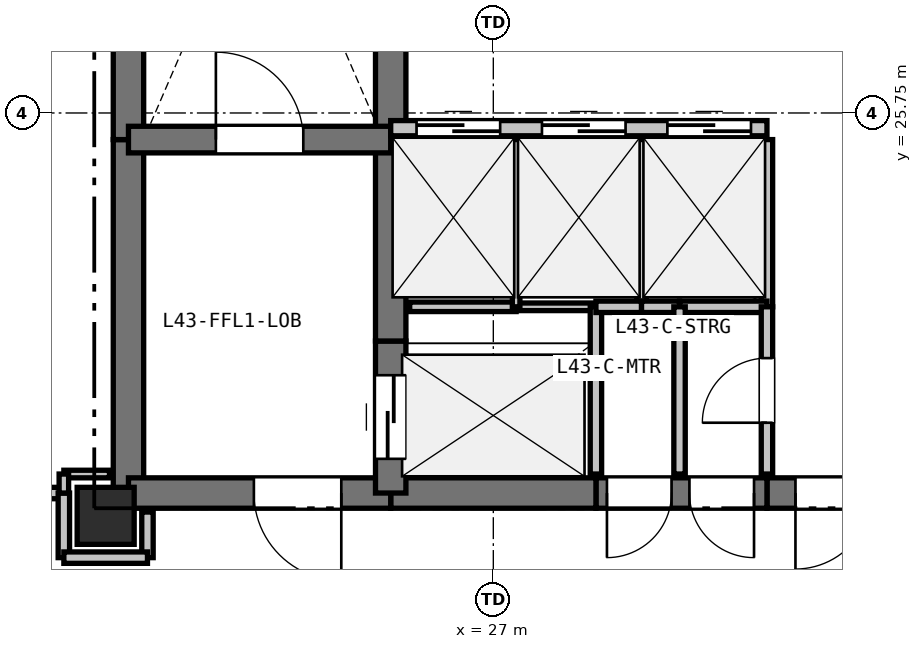
"""IFC4 building model, lengths in metres.
Left out: names, types, materials, properties, quantities, classifications, styles, units other than length and angle.
Written with IfcOpenShell. Run it as: python <this file> out.ifc"""

import sys

from ifc_helpers import new_model, si_unit, direction, frame, frame_2d, origin, origin_2d, place, context, subcontext, project, spatial, rectangle, extrude, element, fill, save


model = new_model("IFC4")
c1 = context("Model", 3, precision=1e-05, world=origin(), true_north=direction((0.0, 1.0)))
c2 = subcontext(c1, "Body", "Model", "MODEL_VIEW")
j1 = project(units=[si_unit("LENGTHUNIT", "METRE"), si_unit("PLANEANGLEUNIT", "RADIAN")], contexts=[c1])
p1 = place(None, origin())
s1 = spatial("IfcSite", under=j1, at=p1, CompositionType="ELEMENT")
p2 = place(p1, origin())
s2 = spatial("IfcBuilding", under=s1, at=p2, CompositionType="ELEMENT")
p3 = place(p2, frame((0.0, 0.0, 154.2)))
s3 = spatial("IfcBuildingStorey", under=s2, at=p3, CompositionType="ELEMENT", Elevation=154.2)
p4 = place(p3, frame((21.9, 20.45, 0.0), z_axis=(0.0, 0.0, 1.0), x_axis=(1.0, 0.0, 0.0)))
e1 = element("IfcColumn", 1, at=p4, inside=s3, PredefinedType="COLUMN", context=c2, shape_type="SweptSolid", body=[
    extrude(rectangle(XDim=0.75, YDim=0.75, at=origin_2d()), origin(), (0.0, 0.0, 1.0), 3.3),
])
p5 = place(p3, frame((22.2, 20.75, 0.0), z_axis=(0.0, 0.0, 1.0), x_axis=(0.0, 1.0, 0.0)))
e2 = element("IfcWall", 2, at=p5, inside=s3, PredefinedType="SHEAR", context=c2, shape_type="SweptSolid", body=[
    extrude(rectangle(XDim=4.65, YDim=0.4, at=frame_2d((2.325, 0.0))), origin(), (0.0, 0.0, 1.0), 3.06),
])
p6 = place(p3, frame((22.2, 25.4, 0.0), z_axis=(0.0, 0.0, 1.0), x_axis=(0.0, 1.0, 0.0)))
e3 = element("IfcWall", 3, at=p6, inside=s3, PredefinedType="SHEAR", context=c2, shape_type="SweptSolid", body=[
    extrude(rectangle(XDim=7.35, YDim=0.4, at=frame_2d((3.675, 0.0))), origin(), (0.0, 0.0, 1.0), 3.06),
])
p7 = place(p3, frame((32.35, 20.75, 0.0), z_axis=(0.0, 0.0, 1.0), x_axis=(-1.0, 0.0, 0.0)))
e4 = element("IfcWall", 4, at=p7, inside=s3, PredefinedType="SHEAR", context=c2, shape_type="SweptSolid", body=[
    extrude(rectangle(XDim=1.75, YDim=0.4, at=frame_2d((0.875, 0.0))), origin(), (0.0, 0.0, 1.0), 3.06),
])
p8 = place(p7, frame((0.375, 0.0, 0.0)))
e5 = element("IfcOpeningElement", 5, at=p8, cuts=e4, PredefinedType="OPENING", context=c2, shape_type="SweptSolid", body=[
    extrude(rectangle(XDim=1.0, YDim=2.15, at=frame_2d((0.5, 1.075))), frame((0.0, 0.21, 0.0), z_axis=(0.0, -1.0, 0.0), x_axis=(1.0, 0.0, 0.0)), (0.0, 0.0, 1.0), 0.42),
])
p9 = place(p3, frame((30.6, 20.75, 0.0), z_axis=(0.0, 0.0, 1.0), x_axis=(-1.0, 0.0, 0.0)))
e6 = element("IfcWall", 6, at=p9, inside=s3, PredefinedType="SHEAR", context=c2, shape_type="SweptSolid", body=[
    extrude(rectangle(XDim=2.25, YDim=0.4, at=frame_2d((1.125, 0.0))), origin(), (0.0, 0.0, 1.0), 3.06),
])
p10 = place(p9, frame((1.255, 0.0, 0.0)))
e7 = element("IfcOpeningElement", 7, at=p10, cuts=e6, PredefinedType="OPENING", context=c2, shape_type="SweptSolid", body=[
    extrude(rectangle(XDim=0.85, YDim=2.1, at=frame_2d((0.425, 1.05))), frame((0.0, 0.21, 0.0), z_axis=(0.0, -1.0, 0.0), x_axis=(1.0, 0.0, 0.0)), (0.0, 0.0, 1.0), 0.42),
])
p11 = place(p9, frame((0.17, 0.0, 0.0)))
e8 = element("IfcOpeningElement", 8, at=p11, cuts=e6, PredefinedType="OPENING", context=c2, shape_type="SweptSolid", body=[
    extrude(rectangle(XDim=0.85, YDim=2.1, at=frame_2d((0.425, 1.05))), frame((0.0, 0.21, 0.0), z_axis=(0.0, -1.0, 0.0), x_axis=(1.0, 0.0, 0.0)), (0.0, 0.0, 1.0), 0.42),
])
p12 = place(p3, frame((28.35, 20.75, 0.0), z_axis=(0.0, 0.0, 1.0), x_axis=(-1.0, 0.0, 0.0)))
e9 = element("IfcWall", 9, at=p12, inside=s3, PredefinedType="SHEAR", context=c2, shape_type="SweptSolid", body=[
    extrude(rectangle(XDim=2.7, YDim=0.4, at=frame_2d((1.35, 0.0))), origin(), (0.0, 0.0, 1.0), 3.06),
])
p13 = place(p3, frame((25.65, 20.75, 0.0), z_axis=(0.0, 0.0, 1.0), x_axis=(-1.0, 0.0, 0.0)))
e10 = element("IfcWall", 10, at=p13, inside=s3, PredefinedType="SHEAR", context=c2, shape_type="SweptSolid", body=[
    extrude(rectangle(XDim=3.45, YDim=0.4, at=frame_2d((1.725, 0.0))), origin(), (0.0, 0.0, 1.0), 3.06),
])
p14 = place(p13, frame((0.65, 0.0, 0.0)))
e11 = element("IfcOpeningElement", 11, at=p14, cuts=e10, PredefinedType="OPENING", context=c2, shape_type="SweptSolid", body=[
    extrude(rectangle(XDim=1.15, YDim=2.15, at=frame_2d((0.575, 1.075))), frame((0.0, 0.21, 0.0), z_axis=(0.0, -1.0, 0.0), x_axis=(1.0, 0.0, 0.0)), (0.0, 0.0, 1.0), 0.42),
])
p15 = place(p3, frame((25.65, 20.75, 0.0), z_axis=(0.0, 0.0, 1.0), x_axis=(0.0, 1.0, 0.0)))
e12 = element("IfcWall", 12, at=p15, inside=s3, PredefinedType="SHEAR", context=c2, shape_type="SweptSolid", body=[
    extrude(rectangle(XDim=2.0, YDim=0.4, at=frame_2d((1.0, 0.0))), origin(), (0.0, 0.0, 1.0), 3.06),
])
p16 = place(p15, frame((0.45, 0.0, 0.0)))
e13 = element("IfcOpeningElement", 13, at=p16, cuts=e12, PredefinedType="OPENING", context=c2, shape_type="SweptSolid", body=[
    extrude(rectangle(XDim=1.1, YDim=2.15, at=frame_2d((0.55, 1.075))), frame((0.0, 0.21, 0.0), z_axis=(0.0, -1.0, 0.0), x_axis=(1.0, 0.0, 0.0)), (0.0, 0.0, 1.0), 0.42),
])
p17 = place(p3, frame((25.65, 22.75, 0.0), z_axis=(0.0, 0.0, 1.0), x_axis=(0.0, 1.0, 0.0)))
e14 = element("IfcWall", 14, at=p17, inside=s3, PredefinedType="SHEAR", context=c2, shape_type="SweptSolid", body=[
    extrude(rectangle(XDim=2.8, YDim=0.4, at=frame_2d((1.4, 0.0))), origin(), (0.0, 0.0, 1.0), 3.06),
])
p18 = place(p3, frame((25.65, 25.55, 0.0), z_axis=(0.0, 0.0, 1.0), x_axis=(0.0, 1.0, 0.0)))
e15 = element("IfcWall", 15, at=p18, inside=s3, PredefinedType="SHEAR", context=c2, shape_type="SweptSolid", body=[
    extrude(rectangle(XDim=2.4, YDim=0.4, at=frame_2d((1.2, 0.0))), origin(), (0.0, 0.0, 1.0), 3.06),
])
p19 = place(p3, frame((22.2, 25.4, 0.0), z_axis=(0.0, 0.0, 1.0), x_axis=(1.0, 0.0, 0.0)))
e16 = element("IfcWall", 16, at=p19, inside=s3, PredefinedType="SHEAR", context=c2, shape_type="SweptSolid", body=[
    extrude(rectangle(XDim=3.45, YDim=0.35, at=frame_2d((1.725, 0.0))), origin(), (0.0, 0.0, 1.0), 3.06),
])
p20 = place(p19, frame((1.15, 0.0, 0.0)))
e17 = element("IfcOpeningElement", 17, at=p20, cuts=e16, PredefinedType="OPENING", context=c2, shape_type="SweptSolid", body=[
    extrude(rectangle(XDim=1.15, YDim=2.15, at=frame_2d((0.575, 1.075))), frame((0.0, 0.185, 0.0), z_axis=(0.0, -1.0, 0.0), x_axis=(1.0, 0.0, 0.0)), (0.0, 0.0, 1.0), 0.37),
])
p21 = place(p3, frame((25.65, 25.55, 0.0), z_axis=(0.0, 0.0, 1.0), x_axis=(1.0, 0.0, 0.0)))
e18 = element("IfcWall", 18, at=p21, inside=s3, PredefinedType="PARTITIONING", context=c2, shape_type="SweptSolid", body=[
    extrude(rectangle(XDim=4.95, YDim=0.2, at=frame_2d((2.475, 0.0))), origin(), (0.0, 0.0, 1.0), 3.06),
])
p22 = place(p21, frame((0.34, 0.0, 0.0)))
e19 = element("IfcOpeningElement", 19, at=p22, cuts=e18, PredefinedType="OPENING", context=c2, shape_type="SweptSolid", body=[
    extrude(rectangle(XDim=1.1, YDim=2.15, at=frame_2d((0.55, 1.075))), frame((0.0, 0.11, 0.0), z_axis=(0.0, -1.0, 0.0), x_axis=(1.0, 0.0, 0.0)), (0.0, 0.0, 1.0), 0.22),
])
p23 = place(p21, frame((1.99, 0.0, 0.0)))
e20 = element("IfcOpeningElement", 20, at=p23, cuts=e18, PredefinedType="OPENING", context=c2, shape_type="SweptSolid", body=[
    extrude(rectangle(XDim=1.1, YDim=2.15, at=frame_2d((0.55, 1.075))), frame((0.0, 0.11, 0.0), z_axis=(0.0, -1.0, 0.0), x_axis=(1.0, 0.0, 0.0)), (0.0, 0.0, 1.0), 0.22),
])
p24 = place(p21, frame((3.64, 0.0, 0.0)))
e21 = element("IfcOpeningElement", 21, at=p24, cuts=e18, PredefinedType="OPENING", context=c2, shape_type="SweptSolid", body=[
    extrude(rectangle(XDim=1.1, YDim=2.15, at=frame_2d((0.55, 1.075))), frame((0.0, 0.11, 0.0), z_axis=(0.0, -1.0, 0.0), x_axis=(1.0, 0.0, 0.0)), (0.0, 0.0, 1.0), 0.22),
])
p25 = place(p3, frame((25.9, 23.2, 0.0), z_axis=(0.0, 0.0, 1.0), x_axis=(1.0, 0.0, 0.0)))
e22 = element("IfcWall", 22, at=p25, inside=s3, PredefinedType="PARTITIONING", context=c2, shape_type="SweptSolid", body=[
    extrude(rectangle(XDim=1.4, YDim=0.125, at=frame_2d((0.7, 0.0))), origin(), (0.0, 0.0, 1.0), 3.06),
])
p26 = place(p3, frame((27.3, 23.2, 0.0), z_axis=(0.0, 0.0, 1.0), x_axis=(1.0, 0.0, 0.0)))
e23 = element("IfcWall", 23, at=p26, inside=s3, PredefinedType="PARTITIONING", context=c2, shape_type="SweptSolid", body=[
    extrude(rectangle(XDim=1.05, YDim=0.1, at=frame_2d((0.525, 0.0))), origin(), (0.0, 0.0, 1.0), 3.06),
])
p27 = place(p3, frame((28.35, 23.2, 0.0), z_axis=(0.0, 0.0, 1.0), x_axis=(0.0, -1.0, 0.0)))
e24 = element("IfcWall", 24, at=p27, inside=s3, PredefinedType="PARTITIONING", context=c2, shape_type="SweptSolid", body=[
    extrude(rectangle(XDim=2.2, YDim=0.15, at=frame_2d((1.1, 0.0))), origin(), (0.0, 0.0, 1.0), 3.06),
])
p28 = place(p3, frame((27.3, 25.4, 0.0), z_axis=(0.0, 0.0, 1.0), x_axis=(0.0, -1.0, 0.0)))
e25 = element("IfcWall", 25, at=p28, inside=s3, PredefinedType="PARTITIONING", context=c2, shape_type="SweptSolid", body=[
    extrude(rectangle(XDim=2.2, YDim=0.1, at=frame_2d((1.1, 0.0))), origin(), (0.0, 0.0, 1.0), 3.06),
])
p29 = place(p3, frame((28.95, 25.4, 0.0), z_axis=(0.0, 0.0, 1.0), x_axis=(0.0, -1.0, 0.0)))
e26 = element("IfcWall", 26, at=p29, inside=s3, PredefinedType="PARTITIONING", context=c2, shape_type="SweptSolid", body=[
    extrude(rectangle(XDim=2.2, YDim=0.125, at=frame_2d((1.1, 0.0))), origin(), (0.0, 0.0, 1.0), 3.06),
])
p30 = place(p3, frame((28.95, 23.2, 0.0), z_axis=(0.0, 0.0, 1.0), x_axis=(-1.0, 0.0, 0.0)))
e27 = element("IfcWall", 27, at=p30, inside=s3, PredefinedType="PARTITIONING", context=c2, shape_type="SweptSolid", body=[
    extrude(rectangle(XDim=0.6, YDim=0.15, at=frame_2d((0.3, 0.0))), origin(), (0.0, 0.0, 1.0), 3.06),
])
p31 = place(p3, frame((30.6, 25.4, 0.0), z_axis=(0.0, 0.0, 1.0), x_axis=(0.0, -1.0, 0.0)))
e28 = element("IfcWall", 28, at=p31, inside=s3, PredefinedType="PARTITIONING", context=c2, shape_type="SweptSolid", body=[
    extrude(rectangle(XDim=2.2, YDim=0.15, at=frame_2d((1.1, 0.0))), origin(), (0.0, 0.0, 1.0), 3.06),
])
p32 = place(p3, frame((30.6, 23.2, 0.0), z_axis=(0.0, 0.0, 1.0), x_axis=(-1.0, 0.0, 0.0)))
e29 = element("IfcWall", 29, at=p32, inside=s3, PredefinedType="PARTITIONING", context=c2, shape_type="SweptSolid", body=[
    extrude(rectangle(XDim=1.15, YDim=0.15, at=frame_2d((0.575, 0.0))), origin(), (0.0, 0.0, 1.0), 3.06),
])
p33 = place(p3, frame((29.45, 23.2, 0.0), z_axis=(0.0, 0.0, 1.0), x_axis=(-1.0, 0.0, 0.0)))
e30 = element("IfcWall", 30, at=p33, inside=s3, PredefinedType="PARTITIONING", context=c2, shape_type="SweptSolid", body=[
    extrude(rectangle(XDim=0.5, YDim=0.15, at=frame_2d((0.25, 0.0))), origin(), (0.0, 0.0, 1.0), 3.06),
])
p34 = place(p3, frame((30.6, 21.0, 0.0), z_axis=(0.0, 0.0, 1.0), x_axis=(0.0, 1.0, 0.0)))
e31 = element("IfcWall", 31, at=p34, inside=s3, PredefinedType="PARTITIONING", context=c2, shape_type="SweptSolid", body=[
    extrude(rectangle(XDim=2.2, YDim=0.15, at=frame_2d((1.1, 0.0))), origin(), (0.0, 0.0, 1.0), 3.06),
])
p35 = place(p34, frame((0.675, 0.0, 0.0)))
e32 = element("IfcOpeningElement", 32, at=p35, cuts=e31, PredefinedType="OPENING", context=c2, shape_type="SweptSolid", body=[
    extrude(rectangle(XDim=0.85, YDim=2.1, at=frame_2d((0.425, 1.05))), frame((0.0, 0.085, 0.0), z_axis=(0.0, -1.0, 0.0), x_axis=(1.0, 0.0, 0.0)), (0.0, 0.0, 1.0), 0.17),
])
p36 = place(p3, frame((22.45, 19.9, 0.0), z_axis=(0.0, 0.0, 1.0), x_axis=(0.0, 1.0, 0.0)))
e33 = element("IfcWall", 33, at=p36, inside=s3, PredefinedType="PARTITIONING", context=c2, shape_type="SweptSolid", body=[
    extrude(rectangle(XDim=0.6, YDim=0.15, at=frame_2d((0.3, 0.0))), origin(), (0.0, 0.0, 1.0), 2.433),
])
p37 = place(p3, frame((20.0, 20.75, 0.0), z_axis=(0.0, 0.0, 1.0), x_axis=(1.0, 0.0, 0.0)))
e34 = element("IfcWall", 34, at=p37, inside=s3, PredefinedType="PARTITIONING", context=c2, shape_type="SweptSolid", body=[
    extrude(rectangle(XDim=1.35, YDim=0.15, at=frame_2d((0.675, 0.0))), origin(), (0.0, 0.0, 1.0), 2.433),
])
p38 = place(p37, frame((0.175, 0.0, 0.0)))
e35 = element("IfcOpeningElement", 35, at=p38, cuts=e34, PredefinedType="OPENING", context=c2, shape_type="SweptSolid", body=[
    extrude(rectangle(XDim=1.0, YDim=2.15, at=frame_2d((0.5, 1.075))), frame((0.0, 0.085, 0.0), z_axis=(0.0, -1.0, 0.0), x_axis=(1.0, 0.0, 0.0)), (0.0, 0.0, 1.0), 0.17),
])
p39 = place(p3, frame((21.35, 20.75, 0.0), z_axis=(0.0, 0.0, 1.0), x_axis=(0.0, -1.0, 0.0)))
e36 = element("IfcWall", 36, at=p39, inside=s3, PredefinedType="PARTITIONING", context=c2, shape_type="SweptSolid", body=[
    extrude(rectangle(XDim=0.85, YDim=0.15, at=frame_2d((0.425, 0.0))), origin(), (0.0, 0.0, 1.0), 2.433),
])
p40 = place(p3, frame((21.35, 19.9, 0.0), z_axis=(0.0, 0.0, 1.0), x_axis=(1.0, 0.0, 0.0)))
e37 = element("IfcWall", 37, at=p40, inside=s3, PredefinedType="PARTITIONING", context=c2, shape_type="SweptSolid", body=[
    extrude(rectangle(XDim=1.1, YDim=0.15, at=frame_2d((0.55, 0.0))), origin(), (0.0, 0.0, 1.0), 2.433),
])
p41 = place(p3, frame((29.45, 23.2, 0.0), z_axis=(0.0, 0.0, 1.0), x_axis=(0.0, -1.0, 0.0)))
e38 = element("IfcWall", 38, at=p41, inside=s3, PredefinedType="PARTITIONING", context=c2, shape_type="SweptSolid", body=[
    extrude(rectangle(XDim=2.2, YDim=0.15, at=frame_2d((1.1, 0.0))), origin(), (0.0, 0.0, 1.0), 3.06),
])
p42 = place(p3, frame((21.95, 21.0, 0.0), z_axis=(0.0, 0.0, 1.0), x_axis=(-1.0, 0.0, 0.0)))
e39 = element("IfcWall", 39, at=p42, inside=s3, PredefinedType="PARTITIONING", context=c2, shape_type="SweptSolid", body=[
    extrude(rectangle(XDim=0.6, YDim=0.1, at=frame_2d((0.3, 0.0))), origin(), (0.0, 0.0, 1.0), 2.585),
])
p43 = place(p3, frame((21.35, 21.0, 0.0), z_axis=(0.0, 0.0, 1.0), x_axis=(0.0, -1.0, 0.0)))
e40 = element("IfcWall", 40, at=p43, inside=s3, PredefinedType="PARTITIONING", context=c2, shape_type="SweptSolid", body=[
    extrude(rectangle(XDim=0.25, YDim=0.125, at=frame_2d((0.125, 0.0))), origin(), (0.0, 0.0, 1.0), 3.06),
])
p44 = place(p22, origin())
e41 = element("IfcDoor", 41, at=p44, inside=s3, OperationType="SLIDING_TO_LEFT", PredefinedType="DOOR", context=c2, shape_type="SweptSolid", body=[
    extrude(rectangle(XDim=1.1, YDim=2.15, at=frame_2d((0.55, 1.075))), frame((0.0, 0.025, 0.0), z_axis=(0.0, -1.0, 0.0), x_axis=(1.0, 0.0, 0.0)), (0.0, 0.0, 1.0), 0.05),
])
fill(e19, e41)
p45 = place(p23, origin())
e42 = element("IfcDoor", 42, at=p45, inside=s3, OperationType="SLIDING_TO_LEFT", PredefinedType="DOOR", context=c2, shape_type="SweptSolid", body=[
    extrude(rectangle(XDim=1.1, YDim=2.15, at=frame_2d((0.55, 1.075))), frame((0.0, 0.025, 0.0), z_axis=(0.0, -1.0, 0.0), x_axis=(1.0, 0.0, 0.0)), (0.0, 0.0, 1.0), 0.05),
])
fill(e20, e42)
p46 = place(p24, origin())
e43 = element("IfcDoor", 43, at=p46, inside=s3, OperationType="SLIDING_TO_LEFT", PredefinedType="DOOR", context=c2, shape_type="SweptSolid", body=[
    extrude(rectangle(XDim=1.1, YDim=2.15, at=frame_2d((0.55, 1.075))), frame((0.0, 0.025, 0.0), z_axis=(0.0, -1.0, 0.0), x_axis=(1.0, 0.0, 0.0)), (0.0, 0.0, 1.0), 0.05),
])
fill(e21, e43)
p47 = place(p8, origin())
e44 = element("IfcDoor", 44, at=p47, inside=s3, OperationType="SINGLE_SWING_RIGHT", PredefinedType="DOOR", context=c2, shape_type="SweptSolid", body=[
    extrude(rectangle(XDim=1.0, YDim=2.15, at=frame_2d((0.5, 1.075))), frame((0.0, 0.025, 0.0), z_axis=(0.0, -1.0, 0.0), x_axis=(1.0, 0.0, 0.0)), (0.0, 0.0, 1.0), 0.05),
])
fill(e5, e44)
p48 = place(p16, origin())
e45 = element("IfcDoor", 45, at=p48, inside=s3, OperationType="SLIDING_TO_LEFT", PredefinedType="DOOR", context=c2, shape_type="SweptSolid", body=[
    extrude(rectangle(XDim=1.1, YDim=2.15, at=frame_2d((0.55, 1.075))), frame((0.0, 0.025, 0.0), z_axis=(0.0, -1.0, 0.0), x_axis=(1.0, 0.0, 0.0)), (0.0, 0.0, 1.0), 0.05),
])
fill(e13, e45)
p49 = place(p20, origin())
e46 = element("IfcDoor", 46, at=p49, inside=s3, OperationType="SINGLE_SWING_LEFT", PredefinedType="DOOR", context=c2, shape_type="SweptSolid", body=[
    extrude(rectangle(XDim=1.15, YDim=2.15, at=frame_2d((0.575, 1.075))), frame((0.0, 0.025, 0.0), z_axis=(0.0, -1.0, 0.0), x_axis=(1.0, 0.0, 0.0)), (0.0, 0.0, 1.0), 0.05),
])
fill(e17, e46)
p50 = place(p14, origin())
e47 = element("IfcDoor", 47, at=p50, inside=s3, OperationType="SINGLE_SWING_LEFT", PredefinedType="DOOR", context=c2, shape_type="SweptSolid", body=[
    extrude(rectangle(XDim=1.15, YDim=2.15, at=frame_2d((0.575, 1.075))), frame((0.0, 0.025, 0.0), z_axis=(0.0, -1.0, 0.0), x_axis=(1.0, 0.0, 0.0)), (0.0, 0.0, 1.0), 0.05),
])
fill(e11, e47)
p51 = place(p35, origin())
e48 = element("IfcDoor", 48, at=p51, inside=s3, OperationType="SINGLE_SWING_LEFT", PredefinedType="DOOR", context=c2, shape_type="SweptSolid", body=[
    extrude(rectangle(XDim=0.85, YDim=2.1, at=frame_2d((0.425, 1.05))), frame((0.0, 0.025, 0.0), z_axis=(0.0, -1.0, 0.0), x_axis=(1.0, 0.0, 0.0)), (0.0, 0.0, 1.0), 0.05),
])
fill(e32, e48)
p52 = place(p10, origin())
e49 = element("IfcDoor", 49, at=p52, inside=s3, OperationType="SINGLE_SWING_RIGHT", PredefinedType="DOOR", context=c2, shape_type="SweptSolid", body=[
    extrude(rectangle(XDim=0.85, YDim=2.1, at=frame_2d((0.425, 1.05))), frame((0.0, 0.025, 0.0), z_axis=(0.0, -1.0, 0.0), x_axis=(1.0, 0.0, 0.0)), (0.0, 0.0, 1.0), 0.05),
])
fill(e7, e49)
p53 = place(p11, origin())
e50 = element("IfcDoor", 50, at=p53, inside=s3, OperationType="SINGLE_SWING_LEFT", PredefinedType="DOOR", context=c2, shape_type="SweptSolid", body=[
    extrude(rectangle(XDim=0.85, YDim=2.1, at=frame_2d((0.425, 1.05))), frame((0.0, 0.025, 0.0), z_axis=(0.0, -1.0, 0.0), x_axis=(1.0, 0.0, 0.0)), (0.0, 0.0, 1.0), 0.05),
])
fill(e8, e50)
save(model, sys.argv[1])
